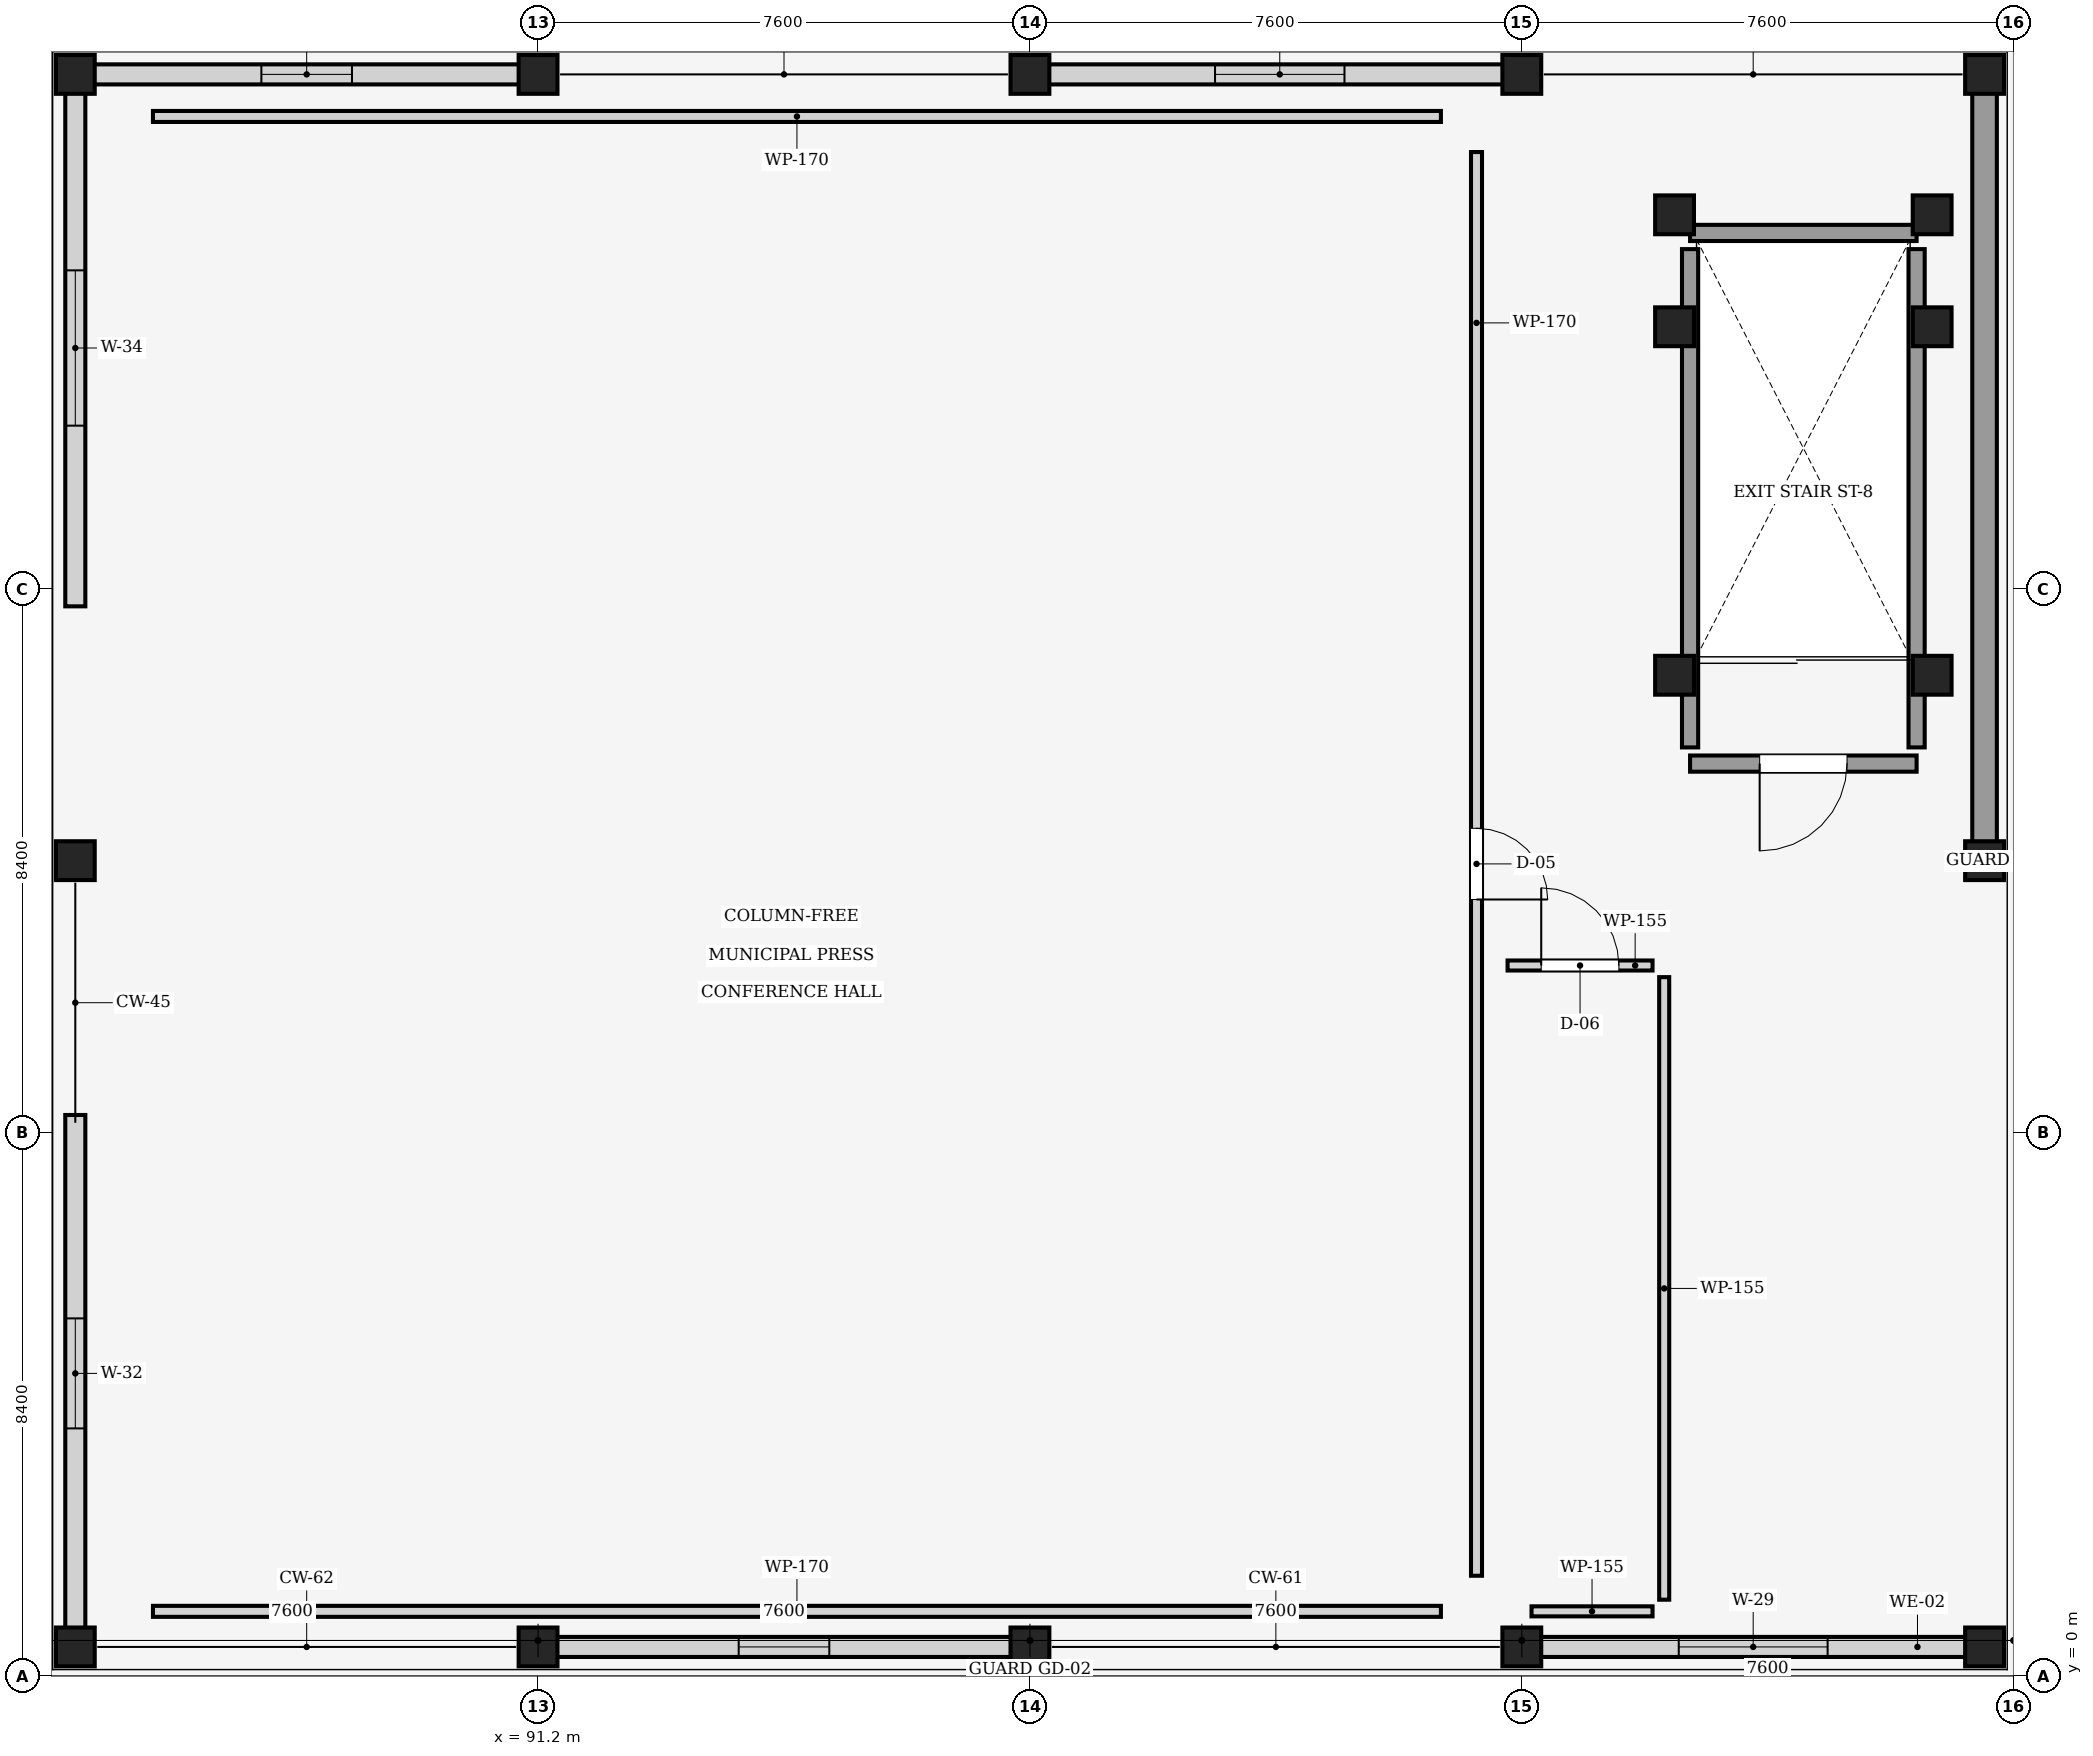
"""IFC4 building model, lengths in metres.
Left out: names, types, materials, properties, quantities, classifications, styles, units other than length and angle.
Written with IfcOpenShell. Run it as: python <this file> out.ifc"""

import sys

from ifc_helpers import new_model, si_unit, direction, frame, frame_2d, origin, origin_2d, place, context, subcontext, project, spatial, rectangle, extrude, element, fill, save


model = new_model("IFC4")
c1 = context("Model", 3, precision=1e-05, world=origin(), true_north=direction((0.0, 1.0)))
c2 = subcontext(c1, "Body", "Model", "MODEL_VIEW")
j1 = project(units=[si_unit("LENGTHUNIT", "METRE"), si_unit("PLANEANGLEUNIT", "RADIAN")], contexts=[c1])
p1 = place(None, origin())
s1 = spatial("IfcSite", under=j1, at=p1, CompositionType="ELEMENT")
p2 = place(p1, origin())
s2 = spatial("IfcBuilding", under=s1, at=p2, CompositionType="ELEMENT")
p3 = place(p2, frame((0.0, 0.0, 5.1)))
s3 = spatial("IfcBuildingStorey", under=s2, at=p3, CompositionType="ELEMENT", Elevation=5.1)
p4 = place(p3, frame((84.05, 0.45, 0.0), z_axis=(0.0, 0.0, 1.0), x_axis=(1.0, 0.0, 0.0)))
e1 = element("IfcColumn", 1, at=p4, inside=s3, PredefinedType="COLUMN", context=c2, shape_type="SweptSolid", body=[
    extrude(rectangle(XDim=0.6, YDim=0.6, at=origin_2d()), origin(), (0.0, 0.0, 1.0), 4.05),
])
p5 = place(p3, frame((84.05, 12.6, 0.0), z_axis=(0.0, 0.0, 1.0), x_axis=(1.0, 0.0, 0.0)))
e2 = element("IfcColumn", 2, at=p5, inside=s3, PredefinedType="COLUMN", context=c2, shape_type="SweptSolid", body=[
    extrude(rectangle(XDim=0.6, YDim=0.6, at=origin_2d()), origin(), (0.0, 0.0, 1.0), 7.0),
])
for number, where, z_axis, x_axis in (
    (3, (84.05, 24.75, 0.0), (0.0, 0.0, 1.0), (1.0, 0.0, 0.0)),
    (4, (91.2, 0.45, 0.0), (0.0, 0.0, 1.0), (1.0, 0.0, 0.0)),
    (5, (91.2, 24.75, 0.0), (0.0, 0.0, 1.0), (1.0, 0.0, 0.0)),
    (6, (98.8, 0.45, 0.0), (0.0, 0.0, 1.0), (1.0, 0.0, 0.0)),
    (7, (98.8, 24.75, 0.0), (0.0, 0.0, 1.0), (1.0, 0.0, 0.0)),
    (8, (106.4, 0.45, 0.0), (0.0, 0.0, 1.0), (1.0, 0.0, 0.0)),
    (9, (106.4, 24.75, 0.0), (0.0, 0.0, 1.0), (1.0, 0.0, 0.0)),
    (10, (113.55, 0.45, 0.0), (0.0, 0.0, 1.0), (1.0, 0.0, 0.0)),
):
    element("IfcColumn", number, at=place(p3, frame(where, z_axis=z_axis, x_axis=x_axis)), inside=s3, PredefinedType="COLUMN", context=c2, shape_type="SweptSolid", body=[
        extrude(rectangle(XDim=0.6, YDim=0.6, at=origin_2d()), origin(), (0.0, 0.0, 1.0), 4.05),
    ])
p6 = place(p3, frame((113.55, 12.6, 0.0), z_axis=(0.0, 0.0, 1.0), x_axis=(1.0, 0.0, 0.0)))
e11 = element("IfcColumn", 11, at=p6, inside=s3, PredefinedType="COLUMN", context=c2, shape_type="SweptSolid", body=[
    extrude(rectangle(XDim=0.6, YDim=0.6, at=origin_2d()), origin(), (0.0, 0.0, 1.0), 7.0),
])
for number, where, z_axis, x_axis in (
    (12, (113.55, 24.75, 0.0), (0.0, 0.0, 1.0), (1.0, 0.0, 0.0)),
    (13, (112.74, 15.465, 0.0), (0.0, 0.0, 1.0), (1.0, 0.0, 0.0)),
    (14, (108.76, 15.465, 0.0), (0.0, 0.0, 1.0), (1.0, 0.0, 0.0)),
    (15, (112.74, 20.85, 0.0), (0.0, 0.0, 1.0), (1.0, 0.0, 0.0)),
    (16, (108.76, 20.85, 0.0), (0.0, 0.0, 1.0), (1.0, 0.0, 0.0)),
    (17, (112.74, 22.58, 0.0), (0.0, 0.0, 1.0), (1.0, 0.0, 0.0)),
    (18, (108.76, 22.58, 0.0), (0.0, 0.0, 1.0), (1.0, 0.0, 0.0)),
):
    element("IfcColumn", number, at=place(p3, frame(where, z_axis=z_axis, x_axis=x_axis)), inside=s3, PredefinedType="COLUMN", context=c2, shape_type="SweptSolid", body=[
        extrude(rectangle(XDim=0.6, YDim=0.6, at=origin_2d()), origin(), (0.0, 0.0, 1.0), 4.05),
    ])
p7 = place(p3, frame((113.315, 0.45, 0.0), z_axis=(0.0, 0.0, 1.0), x_axis=(-1.0, 0.0, 0.0)))
e19 = element("IfcWall", 19, at=p7, inside=s3, PredefinedType="STANDARD", context=c2, shape_type="SweptSolid", body=[
    extrude(rectangle(XDim=6.68, YDim=0.31, at=frame_2d((3.34, 0.0))), origin(), (0.0, 0.0, 1.0), 3.405),
])
p8 = place(p7, frame((2.19, 0.0, 0.85)))
e20 = element("IfcOpeningElement", 20, at=p8, cuts=e19, PredefinedType="OPENING", context=c2, shape_type="SweptSolid", body=[
    extrude(rectangle(XDim=2.3, YDim=1.85, at=frame_2d((1.15, 0.925))), frame((0.0, 0.165, 0.0), z_axis=(0.0, -1.0, 0.0), x_axis=(1.0, 0.0, 0.0)), (0.0, 0.0, 1.0), 0.33),
])
p9 = place(p3, frame((98.565, 0.45, 0.0), z_axis=(0.0, 0.0, 1.0), x_axis=(-1.0, 0.0, 0.0)))
e21 = element("IfcWall", 21, at=p9, inside=s3, PredefinedType="STANDARD", context=c2, shape_type="SweptSolid", body=[
    extrude(rectangle(XDim=7.13, YDim=0.31, at=frame_2d((3.565, 0.0))), origin(), (0.0, 0.0, 1.0), 3.405),
])
p10 = place(p9, frame((2.865, 0.0, 0.85)))
e22 = element("IfcOpeningElement", 22, at=p10, cuts=e21, PredefinedType="OPENING", context=c2, shape_type="SweptSolid", body=[
    extrude(rectangle(XDim=1.4, YDim=2.05, at=frame_2d((0.7, 1.025))), frame((0.0, 0.165, 0.0), z_axis=(0.0, -1.0, 0.0), x_axis=(1.0, 0.0, 0.0)), (0.0, 0.0, 1.0), 0.33),
])
p11 = place(p3, frame((113.55, 24.515, 0.0), z_axis=(0.0, 0.0, 1.0), x_axis=(0.0, -1.0, 0.0)))
e23 = element("IfcWall", 23, at=p11, inside=s3, PredefinedType="SHEAR", context=c2, shape_type="SweptSolid", body=[
    extrude(rectangle(XDim=11.68, YDim=0.38, at=frame_2d((5.84, 0.0))), origin(), (0.0, 0.0, 1.0), 3.7),
])
p12 = place(p3, frame((84.285, 24.75, 0.0), z_axis=(0.0, 0.0, 1.0), x_axis=(1.0, 0.0, 0.0)))
e24 = element("IfcWall", 24, at=p12, inside=s3, PredefinedType="STANDARD", context=c2, shape_type="SweptSolid", body=[
    extrude(rectangle(XDim=6.68, YDim=0.31, at=frame_2d((3.34, 0.0))), origin(), (0.0, 0.0, 1.0), 3.405),
])
p13 = place(p12, frame((2.64, 0.0, 0.85)))
e25 = element("IfcOpeningElement", 25, at=p13, cuts=e24, PredefinedType="OPENING", context=c2, shape_type="SweptSolid", body=[
    extrude(rectangle(XDim=1.4, YDim=2.05, at=frame_2d((0.7, 1.025))), frame((0.0, 0.165, 0.0), z_axis=(0.0, -1.0, 0.0), x_axis=(1.0, 0.0, 0.0)), (0.0, 0.0, 1.0), 0.33),
])
p14 = place(p3, frame((99.035, 24.75, 0.0), z_axis=(0.0, 0.0, 1.0), x_axis=(1.0, 0.0, 0.0)))
e26 = element("IfcWall", 26, at=p14, inside=s3, PredefinedType="STANDARD", context=c2, shape_type="SweptSolid", body=[
    extrude(rectangle(XDim=7.25, YDim=0.31, at=frame_2d((3.625, 0.0))), origin(), (0.0, 0.0, 1.0), 3.405),
])
p15 = place(p14, frame((2.625, 0.0, 0.85)))
e27 = element("IfcOpeningElement", 27, at=p15, cuts=e26, PredefinedType="OPENING", context=c2, shape_type="SweptSolid", body=[
    extrude(rectangle(XDim=2.0, YDim=2.05, at=frame_2d((1.0, 1.025))), frame((0.0, 0.165, 0.0), z_axis=(0.0, -1.0, 0.0), x_axis=(1.0, 0.0, 0.0)), (0.0, 0.0, 1.0), 0.33),
])
p16 = place(p3, frame((84.05, 0.685, 0.0), z_axis=(0.0, 0.0, 1.0), x_axis=(0.0, 1.0, 0.0)))
e28 = element("IfcWall", 28, at=p16, inside=s3, PredefinedType="STANDARD", context=c2, shape_type="SweptSolid", body=[
    extrude(rectangle(XDim=7.985, YDim=0.31, at=frame_2d((3.992, 0.0))), origin(), (0.0, 0.0, 1.0), 3.405),
])
p17 = place(p16, frame((3.142, 0.0, 0.85)))
e29 = element("IfcOpeningElement", 29, at=p17, cuts=e28, PredefinedType="OPENING", context=c2, shape_type="SweptSolid", body=[
    extrude(rectangle(XDim=1.7, YDim=2.05, at=frame_2d((0.85, 1.025))), frame((0.0, 0.165, 0.0), z_axis=(0.0, -1.0, 0.0), x_axis=(1.0, 0.0, 0.0)), (0.0, 0.0, 1.0), 0.33),
])
p18 = place(p3, frame((84.05, 16.53, 0.0), z_axis=(0.0, 0.0, 1.0), x_axis=(0.0, 1.0, 0.0)))
e30 = element("IfcWall", 30, at=p18, inside=s3, PredefinedType="STANDARD", context=c2, shape_type="SweptSolid", body=[
    extrude(rectangle(XDim=7.985, YDim=0.31, at=frame_2d((3.992, 0.0))), origin(), (0.0, 0.0, 1.0), 3.405),
])
p19 = place(p18, frame((2.792, 0.0, 0.85)))
e31 = element("IfcOpeningElement", 31, at=p19, cuts=e30, PredefinedType="OPENING", context=c2, shape_type="SweptSolid", body=[
    extrude(rectangle(XDim=2.4, YDim=2.05, at=frame_2d((1.2, 1.025))), frame((0.0, 0.165, 0.0), z_axis=(0.0, -1.0, 0.0), x_axis=(1.0, 0.0, 0.0)), (0.0, 0.0, 1.0), 0.33),
])
p20 = place(p3, frame((112.5, 14.1, 0.0), z_axis=(0.0, 0.0, 1.0), x_axis=(-1.0, 0.0, 0.0)))
e32 = element("IfcWall", 32, at=p20, inside=s3, PredefinedType="SHEAR", context=c2, shape_type="SweptSolid", body=[
    extrude(rectangle(XDim=3.5, YDim=0.25, at=frame_2d((1.75, 0.0))), origin(), (0.0, 0.0, 1.0), 4.05),
])
p21 = place(p20, frame((1.075, 0.0, 0.0)))
e33 = element("IfcOpeningElement", 33, at=p21, cuts=e32, PredefinedType="OPENING", context=c2, shape_type="SweptSolid", body=[
    extrude(rectangle(XDim=1.35, YDim=2.2, at=frame_2d((0.675, 1.1))), frame((0.0, 0.135, 0.0), z_axis=(0.0, -1.0, 0.0), x_axis=(1.0, 0.0, 0.0)), (0.0, 0.0, 1.0), 0.27),
])
p22 = place(p3, frame((109.0, 14.35, 0.0), z_axis=(0.0, 0.0, 1.0), x_axis=(0.0, 1.0, 0.0)))
e34 = element("IfcWall", 34, at=p22, inside=s3, PredefinedType="SHEAR", context=c2, shape_type="SweptSolid", body=[
    extrude(rectangle(XDim=7.7, YDim=0.25, at=frame_2d((3.85, 0.0))), origin(), (0.0, 0.0, 1.0), 4.05),
])
p23 = place(p3, frame((109.0, 22.3, 0.0), z_axis=(0.0, 0.0, 1.0), x_axis=(1.0, 0.0, 0.0)))
e35 = element("IfcWall", 35, at=p23, inside=s3, PredefinedType="SHEAR", context=c2, shape_type="SweptSolid", body=[
    extrude(rectangle(XDim=3.5, YDim=0.25, at=frame_2d((1.75, 0.0))), origin(), (0.0, 0.0, 1.0), 4.05),
])
p24 = place(p3, frame((112.5, 22.05, 0.0), z_axis=(0.0, 0.0, 1.0), x_axis=(0.0, -1.0, 0.0)))
e36 = element("IfcWall", 36, at=p24, inside=s3, PredefinedType="SHEAR", context=c2, shape_type="SweptSolid", body=[
    extrude(rectangle(XDim=7.7, YDim=0.25, at=frame_2d((3.85, 0.0))), origin(), (0.0, 0.0, 1.0), 4.05),
])
p25 = place(p3, frame((105.7, 23.55, 0.0), z_axis=(0.0, 0.0, 1.0), x_axis=(0.0, -1.0, 0.0)))
e37 = element("IfcWall", 37, at=p25, inside=s3, PredefinedType="PARTITIONING", context=c2, shape_type="SweptSolid", body=[
    extrude(rectangle(XDim=22.0, YDim=0.17, at=frame_2d((11.0, 0.0))), origin(), (0.0, 0.0, 1.0), 3.67),
])
p26 = place(p25, frame((10.45, 0.0, 0.0)))
e38 = element("IfcOpeningElement", 38, at=p26, cuts=e37, PredefinedType="OPENING", context=c2, shape_type="SweptSolid", body=[
    extrude(rectangle(XDim=1.1, YDim=2.1, at=frame_2d((0.55, 1.05))), frame((0.0, 0.095, 0.0), z_axis=(0.0, -1.0, 0.0), x_axis=(1.0, 0.0, 0.0)), (0.0, 0.0, 1.0), 0.19),
])
for number, where, z_axis, x_axis in (
    (39, (85.25, 24.1, 0.0), (0.0, 0.0, 1.0), (1.0, 0.0, 0.0)),
    (40, (105.15, 1.0, 0.0), (0.0, 0.0, 1.0), (-1.0, 0.0, 0.0)),
):
    element("IfcWall", number, at=place(p3, frame(where, z_axis=z_axis, x_axis=x_axis)), inside=s3, PredefinedType="PARTITIONING", context=c2, shape_type="SweptSolid", body=[
        extrude(rectangle(XDim=19.9, YDim=0.17, at=frame_2d((9.95, 0.0))), origin(), (0.0, 0.0, 1.0), 3.67),
    ])
p27 = place(p3, frame((106.18, 10.98, 0.0), z_axis=(0.0, 0.0, 1.0), x_axis=(1.0, 0.0, 0.0)))
e41 = element("IfcWall", 41, at=p27, inside=s3, PredefinedType="PARTITIONING", context=c2, shape_type="SweptSolid", body=[
    extrude(rectangle(XDim=2.24, YDim=0.155, at=frame_2d((1.12, 0.0))), origin(), (0.0, 0.0, 1.0), 3.67),
])
p28 = place(p27, frame((0.52, 0.0, 0.0)))
e42 = element("IfcOpeningElement", 42, at=p28, cuts=e41, PredefinedType="OPENING", context=c2, shape_type="SweptSolid", body=[
    extrude(rectangle(XDim=1.2, YDim=2.1, at=frame_2d((0.6, 1.05))), frame((0.0, 0.087, 0.0), z_axis=(0.0, -1.0, 0.0), x_axis=(1.0, 0.0, 0.0)), (0.0, 0.0, 1.0), 0.175),
])
p29 = place(p3, frame((108.6, 10.8, 0.0), z_axis=(0.0, 0.0, 1.0), x_axis=(0.0, -1.0, 0.0)))
e43 = element("IfcWall", 43, at=p29, inside=s3, PredefinedType="PARTITIONING", context=c2, shape_type="SweptSolid", body=[
    extrude(rectangle(XDim=9.62, YDim=0.155, at=frame_2d((4.81, 0.0))), origin(), (0.0, 0.0, 1.0), 3.67),
])
p30 = place(p3, frame((108.42, 1.0, 0.0), z_axis=(0.0, 0.0, 1.0), x_axis=(-1.0, 0.0, 0.0)))
e44 = element("IfcWall", 44, at=p30, inside=s3, PredefinedType="PARTITIONING", context=c2, shape_type="SweptSolid", body=[
    extrude(rectangle(XDim=1.87, YDim=0.155, at=frame_2d((0.935, 0.0))), origin(), (0.0, 0.0, 1.0), 3.67),
])
p31 = place(p8, origin())
e45 = element("IfcWindow", 45, at=p31, inside=s3, PartitioningType="SINGLE_PANEL", PredefinedType="WINDOW", context=c2, shape_type="SweptSolid", body=[
    extrude(rectangle(XDim=2.3, YDim=1.85, at=frame_2d((1.15, 0.925))), frame((0.0, 0.03, 0.0), z_axis=(0.0, -1.0, 0.0), x_axis=(1.0, 0.0, 0.0)), (0.0, 0.0, 1.0), 0.06),
])
fill(e20, e45)
p32 = place(p10, origin())
e46 = element("IfcWindow", 46, at=p32, inside=s3, PartitioningType="SINGLE_PANEL", PredefinedType="WINDOW", context=c2, shape_type="SweptSolid", body=[
    extrude(rectangle(XDim=1.4, YDim=2.05, at=frame_2d((0.7, 1.025))), frame((0.0, 0.03, 0.0), z_axis=(0.0, -1.0, 0.0), x_axis=(1.0, 0.0, 0.0)), (0.0, 0.0, 1.0), 0.06),
])
fill(e22, e46)
p33 = place(p13, origin())
e47 = element("IfcWindow", 47, at=p33, inside=s3, PartitioningType="SINGLE_PANEL", PredefinedType="WINDOW", context=c2, shape_type="SweptSolid", body=[
    extrude(rectangle(XDim=1.4, YDim=2.05, at=frame_2d((0.7, 1.025))), frame((0.0, 0.03, 0.0), z_axis=(0.0, -1.0, 0.0), x_axis=(1.0, 0.0, 0.0)), (0.0, 0.0, 1.0), 0.06),
])
fill(e25, e47)
p34 = place(p15, origin())
e48 = element("IfcWindow", 48, at=p34, inside=s3, PartitioningType="SINGLE_PANEL", PredefinedType="WINDOW", context=c2, shape_type="SweptSolid", body=[
    extrude(rectangle(XDim=2.0, YDim=2.05, at=frame_2d((1.0, 1.025))), frame((0.0, 0.03, 0.0), z_axis=(0.0, -1.0, 0.0), x_axis=(1.0, 0.0, 0.0)), (0.0, 0.0, 1.0), 0.06),
])
fill(e27, e48)
p35 = place(p17, origin())
e49 = element("IfcWindow", 49, at=p35, inside=s3, PartitioningType="SINGLE_PANEL", PredefinedType="WINDOW", context=c2, shape_type="SweptSolid", body=[
    extrude(rectangle(XDim=1.7, YDim=2.05, at=frame_2d((0.85, 1.025))), frame((0.0, 0.03, 0.0), z_axis=(0.0, -1.0, 0.0), x_axis=(1.0, 0.0, 0.0)), (0.0, 0.0, 1.0), 0.06),
])
fill(e29, e49)
p36 = place(p19, origin())
e50 = element("IfcWindow", 50, at=p36, inside=s3, PartitioningType="SINGLE_PANEL", PredefinedType="WINDOW", context=c2, shape_type="SweptSolid", body=[
    extrude(rectangle(XDim=2.4, YDim=2.05, at=frame_2d((1.2, 1.025))), frame((0.0, 0.03, 0.0), z_axis=(0.0, -1.0, 0.0), x_axis=(1.0, 0.0, 0.0)), (0.0, 0.0, 1.0), 0.06),
])
fill(e31, e50)
p37 = place(p21, origin())
e51 = element("IfcDoor", 51, at=p37, inside=s3, OperationType="SINGLE_SWING_RIGHT", PredefinedType="DOOR", context=c2, shape_type="SweptSolid", body=[
    extrude(rectangle(XDim=1.35, YDim=2.2, at=frame_2d((0.675, 1.1))), frame((0.0, 0.025, 0.0), z_axis=(0.0, -1.0, 0.0), x_axis=(1.0, 0.0, 0.0)), (0.0, 0.0, 1.0), 0.05),
])
fill(e33, e51)
p38 = place(p26, origin())
e52 = element("IfcDoor", 52, at=p38, inside=s3, OperationType="SINGLE_SWING_RIGHT", PredefinedType="DOOR", context=c2, shape_type="SweptSolid", body=[
    extrude(rectangle(XDim=1.1, YDim=2.1, at=frame_2d((0.55, 1.05))), frame((0.0, 0.025, 0.0), z_axis=(0.0, -1.0, 0.0), x_axis=(1.0, 0.0, 0.0)), (0.0, 0.0, 1.0), 0.05),
])
fill(e38, e52)
p39 = place(p28, origin())
e53 = element("IfcDoor", 53, at=p39, inside=s3, OperationType="SINGLE_SWING_LEFT", PredefinedType="DOOR", context=c2, shape_type="SweptSolid", body=[
    extrude(rectangle(XDim=1.2, YDim=2.1, at=frame_2d((0.6, 1.05))), frame((0.0, 0.025, 0.0), z_axis=(0.0, -1.0, 0.0), x_axis=(1.0, 0.0, 0.0)), (0.0, 0.0, 1.0), 0.05),
])
fill(e42, e53)
save(model, sys.argv[1])
